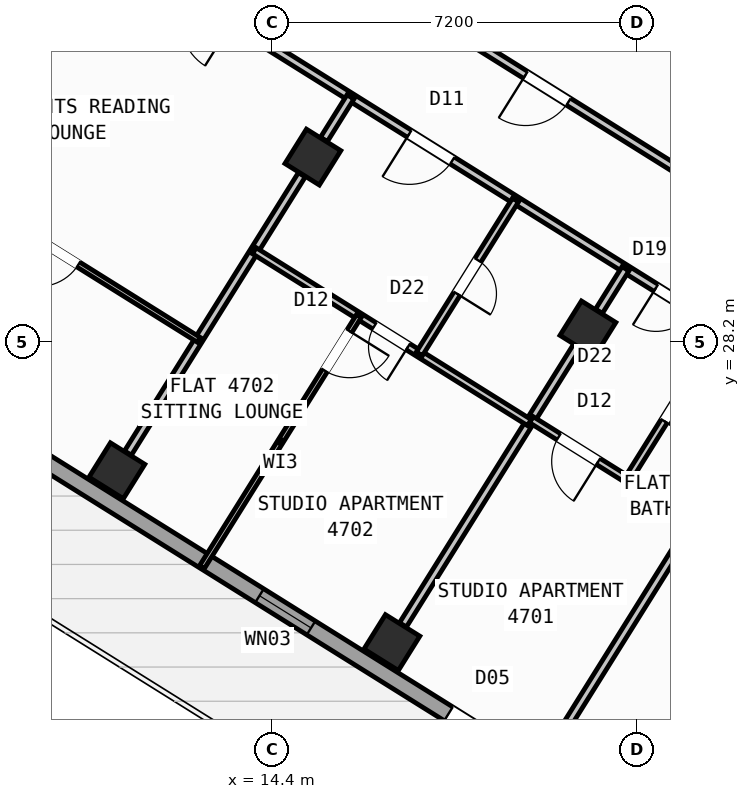
"""IFC4 building model, lengths in metres.
Left out: names, types, materials, properties, quantities, classifications, styles, units other than length and angle.
Written with IfcOpenShell. Run it as: python <this file> out.ifc"""

import sys

from ifc_helpers import new_model, si_unit, direction, frame, frame_2d, origin, origin_2d, place, context, subcontext, project, spatial, rectangle, hollow_rectangle, extrude, source, transform, mapped, element, fill, save


model = new_model("IFC4")
c1 = context("Model", 3, precision=1e-05, world=origin(), true_north=direction((0.0, 1.0)))
c2 = subcontext(c1, "Body", "Model", "MODEL_VIEW")
j1 = project(units=[si_unit("LENGTHUNIT", "METRE"), si_unit("PLANEANGLEUNIT", "RADIAN")], contexts=[c1])
p1 = place(None, origin())
s1 = spatial("IfcSite", under=j1, at=p1, CompositionType="ELEMENT")
p2 = place(p1, origin())
s2 = spatial("IfcBuilding", under=s1, at=p2, CompositionType="ELEMENT")
p3 = place(p2, frame((0.0, 0.0, 187.8)))
s3 = spatial("IfcBuildingStorey", under=s2, at=p3, CompositionType="ELEMENT", Elevation=187.8)
m1 = source(origin(), c2, "Body", "SweptSolid", [
    extrude(hollow_rectangle(XDim=0.8, YDim=0.8, WallThickness=0.032, at=origin_2d()), origin(), (0.0, 0.0, 1.0), 3.6),
])
for number, where, z_axis, x_axis in (
    (1, (20.632, 28.452, 0.0), (0.0, 0.0, 1.0), (-0.848, 0.53, 0.0)),
    (2, (16.764, 22.261, 0.0), (0.0, 0.0, 1.0), (-0.848, 0.53, 0.0)),
    (3, (15.205, 31.844, 0.0), (0.0, 0.0, 1.0), (-0.848, 0.53, 0.0)),
    (4, (11.336, 25.653, 0.0), (0.0, 0.0, 1.0), (-0.848, 0.53, 0.0)),
):
    element("IfcColumn", number, at=place(p3, frame(where, z_axis=z_axis, x_axis=x_axis)), inside=s3, PredefinedType="COLUMN", context=c2, shape_type="MappedRepresentation", body=[
        mapped(m1, transform((0.0, 0.0, 0.0), scale=1.0)),
    ])
p4 = place(p3, frame((31.76, 12.183, 0.0), z_axis=(0.0, 0.0, 1.0), x_axis=(-0.848047074256, 0.529920899612, 0.0)))
e5 = element("IfcWall", 5, at=p4, inside=s3, PredefinedType="STANDARD", context=c2, shape_type="SweptSolid", body=[
    extrude(rectangle(XDim=30.652, YDim=0.32, at=frame_2d((15.326, 0.0))), origin(), (0.0, 0.0, 1.0), 3.35),
])
p5 = place(p4, frame((15.166, 0.0, 0.0)))
e6 = element("IfcOpeningElement", 6, at=p5, cuts=e5, PredefinedType="OPENING", context=c2, shape_type="SweptSolid", body=[
    extrude(rectangle(XDim=1.2, YDim=2.15, at=frame_2d((0.6, 1.075))), frame((0.0, 0.17, 0.0), z_axis=(0.0, -1.0, 0.0), x_axis=(1.0, 0.0, 0.0)), (0.0, 0.0, 1.0), 0.34),
])
p6 = place(p4, frame((2.015, 0.0, 0.8)))
e7 = element("IfcOpeningElement", 7, at=p6, cuts=e5, PredefinedType="OPENING", context=c2, shape_type="SweptSolid", body=[
    extrude(rectangle(XDim=2.1, YDim=1.55, at=frame_2d((1.05, 0.775))), frame((0.0, 0.17, 0.0), z_axis=(0.0, -1.0, 0.0), x_axis=(1.0, 0.0, 0.0)), (0.0, 0.0, 1.0), 0.34),
])
p7 = place(p4, frame((7.244, 0.0, 0.8)))
e8 = element("IfcOpeningElement", 8, at=p7, cuts=e5, PredefinedType="OPENING", context=c2, shape_type="SweptSolid", body=[
    extrude(rectangle(XDim=2.1, YDim=1.55, at=frame_2d((1.05, 0.775))), frame((0.0, 0.17, 0.0), z_axis=(0.0, -1.0, 0.0), x_axis=(1.0, 0.0, 0.0)), (0.0, 0.0, 1.0), 0.34),
])
p8 = place(p4, frame((12.623, 0.0, 1.0)))
e9 = element("IfcOpeningElement", 9, at=p8, cuts=e5, PredefinedType="OPENING", context=c2, shape_type="SweptSolid", body=[
    extrude(rectangle(XDim=0.9, YDim=1.25, at=frame_2d((0.45, 0.625))), frame((0.0, 0.17, 0.0), z_axis=(0.0, -1.0, 0.0), x_axis=(1.0, 0.0, 0.0)), (0.0, 0.0, 1.0), 0.34),
])
p9 = place(p4, frame((19.565, 0.0, 0.95)))
e10 = element("IfcOpeningElement", 10, at=p9, cuts=e5, PredefinedType="OPENING", context=c2, shape_type="SweptSolid", body=[
    extrude(rectangle(XDim=1.2, YDim=1.4, at=frame_2d((0.6, 0.7))), frame((0.0, 0.17, 0.0), z_axis=(0.0, -1.0, 0.0), x_axis=(1.0, 0.0, 0.0)), (0.0, 0.0, 1.0), 0.34),
])
p10 = place(p4, frame((25.983, 0.0, 1.0)))
e11 = element("IfcOpeningElement", 11, at=p10, cuts=e5, PredefinedType="OPENING", context=c2, shape_type="SweptSolid", body=[
    extrude(rectangle(XDim=0.9, YDim=1.25, at=frame_2d((0.45, 0.625))), frame((0.0, 0.17, 0.0), z_axis=(0.0, -1.0, 0.0), x_axis=(1.0, 0.0, 0.0)), (0.0, 0.0, 1.0), 0.34),
])
p11 = place(p4, frame((28.433, 0.0, 1.0)))
e12 = element("IfcOpeningElement", 12, at=p11, cuts=e5, PredefinedType="OPENING", context=c2, shape_type="SweptSolid", body=[
    extrude(rectangle(XDim=0.9, YDim=1.25, at=frame_2d((0.45, 0.625))), frame((0.0, 0.17, 0.0), z_axis=(0.0, -1.0, 0.0), x_axis=(1.0, 0.0, 0.0)), (0.0, 0.0, 1.0), 0.34),
])
p12 = place(p3, frame((5.7, 28.71, 0.0), z_axis=(0.0, 0.0, 1.0), x_axis=(0.529923711467, 0.8480453172, 0.0)))
e13 = element("IfcWall", 13, at=p12, inside=s3, PredefinedType="STANDARD", context=c2, shape_type="SweptSolid", body=[
    extrude(rectangle(XDim=21.587, YDim=0.32, at=frame_2d((10.794, 0.0))), origin(), (0.0, 0.0, 1.0), 2.825),
])
p13 = place(p12, frame((1.44, 0.0, 0.95)))
e14 = element("IfcOpeningElement", 14, at=p13, cuts=e13, PredefinedType="OPENING", context=c2, shape_type="SweptSolid", body=[
    extrude(rectangle(XDim=1.2, YDim=1.4, at=frame_2d((0.6, 0.7))), frame((0.0, 0.17, 0.0), z_axis=(0.0, -1.0, 0.0), x_axis=(1.0, 0.0, 0.0)), (0.0, 0.0, 1.0), 0.34),
])
p14 = place(p12, frame((4.545, 0.0, 0.85)))
e15 = element("IfcOpeningElement", 15, at=p14, cuts=e13, PredefinedType="OPENING", context=c2, shape_type="SweptSolid", body=[
    extrude(rectangle(XDim=1.8, YDim=1.5, at=frame_2d((0.9, 0.75))), frame((0.0, 0.17, 0.0), z_axis=(0.0, -1.0, 0.0), x_axis=(1.0, 0.0, 0.0)), (0.0, 0.0, 1.0), 0.34),
])
p15 = place(p12, frame((12.139, 0.0, 1.0)))
e16 = element("IfcOpeningElement", 16, at=p15, cuts=e13, PredefinedType="OPENING", context=c2, shape_type="SweptSolid", body=[
    extrude(rectangle(XDim=0.9, YDim=1.25, at=frame_2d((0.45, 0.625))), frame((0.0, 0.17, 0.0), z_axis=(0.0, -1.0, 0.0), x_axis=(1.0, 0.0, 0.0)), (0.0, 0.0, 1.0), 0.34),
])
p16 = place(p12, frame((16.35, 0.0, 0.95)))
e17 = element("IfcOpeningElement", 17, at=p16, cuts=e13, PredefinedType="OPENING", context=c2, shape_type="SweptSolid", body=[
    extrude(rectangle(XDim=1.2, YDim=1.4, at=frame_2d((0.6, 0.7))), frame((0.0, 0.17, 0.0), z_axis=(0.0, -1.0, 0.0), x_axis=(1.0, 0.0, 0.0)), (0.0, 0.0, 1.0), 0.34),
])
p17 = place(p12, frame((18.762, 0.0, 0.95)))
e18 = element("IfcOpeningElement", 18, at=p17, cuts=e13, PredefinedType="OPENING", context=c2, shape_type="SweptSolid", body=[
    extrude(rectangle(XDim=1.2, YDim=1.4, at=frame_2d((0.6, 0.7))), frame((0.0, 0.17, 0.0), z_axis=(0.0, -1.0, 0.0), x_axis=(1.0, 0.0, 0.0)), (0.0, 0.0, 1.0), 0.34),
])
p18 = place(p3, frame((17.424, 47.083, 0.0), z_axis=(0.0, 0.0, 1.0), x_axis=(0.848049927979, -0.529916332693, 0.0)))
e19 = element("IfcWall", 19, at=p18, inside=s3, PredefinedType="STANDARD", context=c2, shape_type="SweptSolid", body=[
    extrude(rectangle(XDim=29.223, YDim=0.32, at=frame_2d((14.612, 0.0))), origin(), (0.0, 0.0, 1.0), 3.35),
])
p19 = place(p18, frame((3.764, 0.0, 0.0)))
e20 = element("IfcOpeningElement", 20, at=p19, cuts=e19, PredefinedType="OPENING", context=c2, shape_type="SweptSolid", body=[
    extrude(rectangle(XDim=1.05, YDim=2.15, at=frame_2d((0.525, 1.075))), frame((0.0, 0.17, 0.0), z_axis=(0.0, -1.0, 0.0), x_axis=(1.0, 0.0, 0.0)), (0.0, 0.0, 1.0), 0.34),
])
p20 = place(p18, frame((8.344, 0.0, 0.8)))
e21 = element("IfcOpeningElement", 21, at=p20, cuts=e19, PredefinedType="OPENING", context=c2, shape_type="SweptSolid", body=[
    extrude(rectangle(XDim=2.1, YDim=1.55, at=frame_2d((1.05, 0.775))), frame((0.0, 0.17, 0.0), z_axis=(0.0, -1.0, 0.0), x_axis=(1.0, 0.0, 0.0)), (0.0, 0.0, 1.0), 0.34),
])
p21 = place(p18, frame((13.589, 0.0, 0.85)))
e22 = element("IfcOpeningElement", 22, at=p21, cuts=e19, PredefinedType="OPENING", context=c2, shape_type="SweptSolid", body=[
    extrude(rectangle(XDim=1.8, YDim=1.5, at=frame_2d((0.9, 0.75))), frame((0.0, 0.17, 0.0), z_axis=(0.0, -1.0, 0.0), x_axis=(1.0, 0.0, 0.0)), (0.0, 0.0, 1.0), 0.34),
])
p22 = place(p18, frame((17.104, 0.0, 0.95)))
e23 = element("IfcOpeningElement", 23, at=p22, cuts=e19, PredefinedType="OPENING", context=c2, shape_type="SweptSolid", body=[
    extrude(rectangle(XDim=1.2, YDim=1.4, at=frame_2d((0.6, 0.7))), frame((0.0, 0.17, 0.0), z_axis=(0.0, -1.0, 0.0), x_axis=(1.0, 0.0, 0.0)), (0.0, 0.0, 1.0), 0.34),
])
p23 = place(p18, frame((21.214, 0.0, 0.95)))
e24 = element("IfcOpeningElement", 24, at=p23, cuts=e19, PredefinedType="OPENING", context=c2, shape_type="SweptSolid", body=[
    extrude(rectangle(XDim=1.2, YDim=1.4, at=frame_2d((0.6, 0.7))), frame((0.0, 0.17, 0.0), z_axis=(0.0, -1.0, 0.0), x_axis=(1.0, 0.0, 0.0)), (0.0, 0.0, 1.0), 0.34),
])
p24 = place(p18, frame((25.853, 0.0, 0.95)))
e25 = element("IfcOpeningElement", 25, at=p24, cuts=e19, PredefinedType="OPENING", context=c2, shape_type="SweptSolid", body=[
    extrude(rectangle(XDim=1.2, YDim=1.4, at=frame_2d((0.6, 0.7))), frame((0.0, 0.17, 0.0), z_axis=(0.0, -1.0, 0.0), x_axis=(1.0, 0.0, 0.0)), (0.0, 0.0, 1.0), 0.34),
])
p25 = place(p3, frame((24.588, 27.631, 0.0), z_axis=(0.0, 0.0, 1.0), x_axis=(-0.529914992377, -0.848050765494, 0.0)))
e26 = element("IfcWall", 26, at=p25, inside=s3, PredefinedType="PARTITIONING", context=c2, shape_type="SweptSolid", body=[
    extrude(rectangle(XDim=9.15, YDim=0.16, at=frame_2d((4.575, 0.0))), origin(), (0.0, 0.0, 1.0), 3.34),
])
p26 = place(p3, frame((25.754, 29.497, 0.0), z_axis=(0.0, 0.0, 1.0), x_axis=(-0.848045850158, 0.529922858565, 0.0)))
e27 = element("IfcWall", 27, at=p26, inside=s3, PredefinedType="PARTITIONING", context=c2, shape_type="SweptSolid", body=[
    extrude(rectangle(XDim=16.73, YDim=0.16, at=frame_2d((8.365, 0.0))), origin(), (0.0, 0.0, 1.0), 3.34),
])
p27 = place(p26, frame((2.22, 0.0, 0.0)))
e28 = element("IfcOpeningElement", 28, at=p27, cuts=e27, PredefinedType="OPENING", context=c2, shape_type="SweptSolid", body=[
    extrude(rectangle(XDim=0.86, YDim=2.05, at=frame_2d((0.43, 1.025))), frame((0.0, 0.09, 0.0), z_axis=(0.0, -1.0, 0.0), x_axis=(1.0, 0.0, 0.0)), (0.0, 0.0, 1.0), 0.18),
])
p28 = place(p26, frame((6.49, 0.0, 0.0)))
e29 = element("IfcOpeningElement", 29, at=p28, cuts=e27, PredefinedType="OPENING", context=c2, shape_type="SweptSolid", body=[
    extrude(rectangle(XDim=1.0, YDim=2.1, at=frame_2d((0.5, 1.05))), frame((0.0, 0.09, 0.0), z_axis=(0.0, -1.0, 0.0), x_axis=(1.0, 0.0, 0.0)), (0.0, 0.0, 1.0), 0.18),
])
p29 = place(p26, frame((14.304, 0.0, 0.0)))
e30 = element("IfcOpeningElement", 30, at=p29, cuts=e27, PredefinedType="OPENING", context=c2, shape_type="SweptSolid", body=[
    extrude(rectangle(XDim=1.0, YDim=2.1, at=frame_2d((0.5, 1.05))), frame((0.0, 0.09, 0.0), z_axis=(0.0, -1.0, 0.0), x_axis=(1.0, 0.0, 0.0)), (0.0, 0.0, 1.0), 0.18),
])
p30 = place(p3, frame((24.588, 27.631, 0.0), z_axis=(0.0, 0.0, 1.0), x_axis=(-0.848041752158, 0.529929416617, 0.0)))
e31 = element("IfcWall", 31, at=p30, inside=s3, PredefinedType="PARTITIONING", context=c2, shape_type="SweptSolid", body=[
    extrude(rectangle(XDim=16.73, YDim=0.16, at=frame_2d((8.365, 0.0))), origin(), (0.0, 0.0, 1.0), 3.34),
])
p31 = place(p30, frame((2.22, 0.0, 0.0)))
e32 = element("IfcOpeningElement", 32, at=p31, cuts=e31, PredefinedType="OPENING", context=c2, shape_type="SweptSolid", body=[
    extrude(rectangle(XDim=0.86, YDim=2.05, at=frame_2d((0.43, 1.025))), frame((0.0, 0.09, 0.0), z_axis=(0.0, -1.0, 0.0), x_axis=(1.0, 0.0, 0.0)), (0.0, 0.0, 1.0), 0.18),
])
p32 = place(p30, frame((7.82, 0.0, 0.0)))
e33 = element("IfcOpeningElement", 33, at=p32, cuts=e31, PredefinedType="OPENING", context=c2, shape_type="SweptSolid", body=[
    extrude(rectangle(XDim=1.0, YDim=2.1, at=frame_2d((0.5, 1.05))), frame((0.0, 0.09, 0.0), z_axis=(0.0, -1.0, 0.0), x_axis=(1.0, 0.0, 0.0)), (0.0, 0.0, 1.0), 0.18),
])
p33 = place(p30, frame((12.95, 0.0, 0.0)))
e34 = element("IfcOpeningElement", 34, at=p33, cuts=e31, PredefinedType="OPENING", context=c2, shape_type="SweptSolid", body=[
    extrude(rectangle(XDim=1.0, YDim=2.1, at=frame_2d((0.5, 1.05))), frame((0.0, 0.09, 0.0), z_axis=(0.0, -1.0, 0.0), x_axis=(1.0, 0.0, 0.0)), (0.0, 0.0, 1.0), 0.18),
])
p34 = place(p3, frame((21.374, 29.639, 0.0), z_axis=(0.0, 0.0, 1.0), x_axis=(-0.529998940003, -0.847998304005, 0.0)))
e35 = element("IfcWall", 35, at=p34, inside=s3, PredefinedType="PARTITIONING", context=c2, shape_type="SweptSolid", body=[
    extrude(rectangle(XDim=0.988, YDim=0.16, at=frame_2d((0.494, 0.0))), origin(), (0.0, 0.0, 1.0), 2.825),
])
p35 = place(p3, frame((20.414, 28.103, 0.0), z_axis=(0.0, 0.0, 1.0), x_axis=(-0.529934553702, -0.848038542045, 0.0)))
e36 = element("IfcWall", 36, at=p35, inside=s3, PredefinedType="PARTITIONING", context=c2, shape_type="SweptSolid", body=[
    extrude(rectangle(XDim=6.476, YDim=0.16, at=frame_2d((3.238, 0.0))), origin(), (0.0, 0.0, 1.0), 2.825),
])
p36 = place(p3, frame((22.728, 24.654, 0.0), z_axis=(0.0, 0.0, 1.0), x_axis=(-0.848059820872, 0.529900500304, 0.0)))
e37 = element("IfcWall", 37, at=p36, inside=s3, PredefinedType="PLUMBINGWALL", context=c2, shape_type="SweptSolid", body=[
    extrude(rectangle(XDim=3.79, YDim=0.14, at=frame_2d((1.895, 0.0))), origin(), (0.0, 0.0, 1.0), 3.34),
])
p37 = place(p36, frame((2.23, 0.0, 0.0)))
e38 = element("IfcOpeningElement", 38, at=p37, cuts=e37, PredefinedType="OPENING", context=c2, shape_type="SweptSolid", body=[
    extrude(rectangle(XDim=0.92, YDim=2.08, at=frame_2d((0.46, 1.04))), frame((0.0, 0.08, 0.0), z_axis=(0.0, -1.0, 0.0), x_axis=(1.0, 0.0, 0.0)), (0.0, 0.0, 1.0), 0.16),
])
p38 = place(p3, frame((23.273, 28.452, 0.0), z_axis=(0.0, 0.0, 1.0), x_axis=(-0.529867639402, -0.848080352747, 0.0)))
e39 = element("IfcWall", 39, at=p38, inside=s3, PredefinedType="PLUMBINGWALL", context=c2, shape_type="SweptSolid", body=[
    extrude(rectangle(XDim=3.51, YDim=0.14, at=frame_2d((1.755, 0.0))), origin(), (0.0, 0.0, 1.0), 2.995),
])
p39 = place(p38, frame((1.365, 0.0, 0.0)))
e40 = element("IfcOpeningElement", 40, at=p39, cuts=e39, PredefinedType="OPENING", context=c2, shape_type="SweptSolid", body=[
    extrude(rectangle(XDim=0.78, YDim=2.05, at=frame_2d((0.39, 1.025))), frame((0.0, 0.08, 0.0), z_axis=(0.0, -1.0, 0.0), x_axis=(1.0, 0.0, 0.0)), (0.0, 0.0, 1.0), 0.16),
])
p40 = place(p3, frame((15.946, 33.031, 0.0), z_axis=(0.0, 0.0, 1.0), x_axis=(-0.529821225456, -0.848109349704, 0.0)))
e41 = element("IfcWall", 41, at=p40, inside=s3, PredefinedType="PARTITIONING", context=c2, shape_type="SweptSolid", body=[
    extrude(rectangle(XDim=0.988, YDim=0.16, at=frame_2d((0.494, 0.0))), origin(), (0.0, 0.0, 1.0), 2.825),
])
p41 = place(p3, frame((14.986, 31.494, 0.0), z_axis=(0.0, 0.0, 1.0), x_axis=(-0.529907440938, -0.848055484057, 0.0)))
e42 = element("IfcWall", 42, at=p41, inside=s3, PredefinedType="PARTITIONING", context=c2, shape_type="SweptSolid", body=[
    extrude(rectangle(XDim=6.476, YDim=0.16, at=frame_2d((3.238, 0.0))), origin(), (0.0, 0.0, 1.0), 2.825),
])
p42 = place(p3, frame((19.477, 26.603, 0.0), z_axis=(0.0, 0.0, 1.0), x_axis=(-0.848039019877, 0.529933789039, 0.0)))
e43 = element("IfcWall", 43, at=p42, inside=s3, PredefinedType="PLUMBINGWALL", context=c2, shape_type="SweptSolid", body=[
    extrude(rectangle(XDim=6.4, YDim=0.14, at=frame_2d((3.2, 0.0))), origin(), (0.0, 0.0, 1.0), 3.34),
])
p43 = place(p42, frame((2.824, 0.0, 0.0)))
e44 = element("IfcOpeningElement", 44, at=p43, cuts=e43, PredefinedType="OPENING", context=c2, shape_type="SweptSolid", body=[
    extrude(rectangle(XDim=0.78, YDim=2.05, at=frame_2d((0.39, 1.025))), frame((0.0, 0.08, 0.0), z_axis=(0.0, -1.0, 0.0), x_axis=(1.0, 0.0, 0.0)), (0.0, 0.0, 1.0), 0.16),
])
p44 = place(p3, frame((19.203, 30.996, 0.0), z_axis=(0.0, 0.0, 1.0), x_axis=(-0.529906983049, -0.848055770169, 0.0)))
e45 = element("IfcWall", 45, at=p44, inside=s3, PredefinedType="PLUMBINGWALL", context=c2, shape_type="SweptSolid", body=[
    extrude(rectangle(XDim=3.58, YDim=0.14, at=frame_2d((1.79, 0.0))), origin(), (0.0, 0.0, 1.0), 3.34),
])
p45 = place(p44, frame((1.4, 0.0, 0.0)))
e46 = element("IfcOpeningElement", 46, at=p45, cuts=e45, PredefinedType="OPENING", context=c2, shape_type="SweptSolid", body=[
    extrude(rectangle(XDim=0.78, YDim=2.05, at=frame_2d((0.39, 1.025))), frame((0.0, 0.08, 0.0), z_axis=(0.0, -1.0, 0.0), x_axis=(1.0, 0.0, 0.0)), (0.0, 0.0, 1.0), 0.16),
])
p46 = place(p3, frame((16.112, 28.706, 0.0), z_axis=(0.0, 0.0, 1.0), x_axis=(-0.529916267533, -0.848049968695, 0.0)))
e47 = element("IfcWall", 47, at=p46, inside=s3, PredefinedType="PARTITIONING", context=c2, shape_type="SweptSolid", body=[
    extrude(rectangle(XDim=5.84, YDim=0.11, at=frame_2d((2.92, 0.0))), origin(), (0.0, 0.0, 1.0), 3.34),
])
p47 = place(p46, frame((0.35, 0.0, 0.0)))
e48 = element("IfcOpeningElement", 48, at=p47, cuts=e47, PredefinedType="OPENING", context=c2, shape_type="SweptSolid", body=[
    extrude(rectangle(XDim=0.92, YDim=2.08, at=frame_2d((0.46, 1.04))), frame((0.0, 0.065, 0.0), z_axis=(0.0, -1.0, 0.0), x_axis=(1.0, 0.0, 0.0)), (0.0, 0.0, 1.0), 0.13),
])
p48 = place(p3, frame((12.951, 28.238, 0.0), z_axis=(0.0, 0.0, 1.0), x_axis=(-0.848031959833, 0.529945086874, 0.0)))
e49 = element("IfcWall", 49, at=p48, inside=s3, PredefinedType="PARTITIONING", context=c2, shape_type="SweptSolid", body=[
    extrude(rectangle(XDim=6.52, YDim=0.11, at=frame_2d((3.26, 0.0))), origin(), (0.0, 0.0, 1.0), 3.34),
])
p49 = place(p48, frame((2.8, 0.0, 0.0)))
e50 = element("IfcOpeningElement", 50, at=p49, cuts=e49, PredefinedType="OPENING", context=c2, shape_type="SweptSolid", body=[
    extrude(rectangle(XDim=0.92, YDim=2.08, at=frame_2d((0.46, 1.04))), frame((0.0, 0.065, 0.0), z_axis=(0.0, -1.0, 0.0), x_axis=(1.0, 0.0, 0.0)), (0.0, 0.0, 1.0), 0.13),
])
m2 = source(origin(), c2, "Body", "SweptSolid", [
    extrude(rectangle(XDim=1.2, YDim=2.15, at=frame_2d((0.6, 1.075))), frame((0.0, 0.025, 0.0), z_axis=(0.0, -1.0, 0.0), x_axis=(1.0, 0.0, 0.0)), (0.0, 0.0, 1.0), 0.05),
])
p50 = place(p5, origin())
e51 = element("IfcDoor", 51, at=p50, inside=s3, OperationType="SINGLE_SWING_LEFT", PredefinedType="DOOR", context=c2, shape_type="MappedRepresentation", body=[
    mapped(m2, transform((0.0, 0.0, 0.0), scale=1.0)),
])
fill(e6, e51)
m3 = source(origin(), c2, "Body", "SweptSolid", [
    extrude(rectangle(XDim=1.2, YDim=1.4, at=frame_2d((0.6, 0.7))), frame((0.0, 0.03, 0.0), z_axis=(0.0, -1.0, 0.0), x_axis=(1.0, 0.0, 0.0)), (0.0, 0.0, 1.0), 0.06),
])
p51 = place(p9, origin())
e52 = element("IfcWindow", 52, at=p51, inside=s3, PartitioningType="SINGLE_PANEL", PredefinedType="WINDOW", context=c2, shape_type="MappedRepresentation", body=[
    mapped(m3, transform((0.0, 0.0, 0.0), scale=1.0)),
])
fill(e10, e52)
m4 = source(origin(), c2, "Body", "SweptSolid", [
    extrude(rectangle(XDim=0.86, YDim=2.05, at=frame_2d((0.43, 1.025))), frame((0.0, 0.025, 0.0), z_axis=(0.0, -1.0, 0.0), x_axis=(1.0, 0.0, 0.0)), (0.0, 0.0, 1.0), 0.05),
])
p52 = place(p31, origin())
e53 = element("IfcDoor", 53, at=p52, inside=s3, OperationType="SINGLE_SWING_RIGHT", PredefinedType="DOOR", context=c2, shape_type="MappedRepresentation", body=[
    mapped(m4, transform((0.0, 0.0, 0.0), scale=1.0)),
])
fill(e32, e53)
m5 = source(origin(), c2, "Body", "SweptSolid", [
    extrude(rectangle(XDim=0.92, YDim=2.08, at=frame_2d((0.46, 1.04))), frame((0.0, 0.025, 0.0), z_axis=(0.0, -1.0, 0.0), x_axis=(1.0, 0.0, 0.0)), (0.0, 0.0, 1.0), 0.05),
])
p53 = place(p37, origin())
e54 = element("IfcDoor", 54, at=p53, inside=s3, OperationType="SINGLE_SWING_LEFT", PredefinedType="DOOR", context=c2, shape_type="MappedRepresentation", body=[
    mapped(m5, transform((0.0, 0.0, 0.0), scale=1.0)),
])
fill(e38, e54)
m6 = source(origin(), c2, "Body", "SweptSolid", [
    extrude(rectangle(XDim=0.78, YDim=2.05, at=frame_2d((0.39, 1.025))), frame((0.0, 0.025, 0.0), z_axis=(0.0, -1.0, 0.0), x_axis=(1.0, 0.0, 0.0)), (0.0, 0.0, 1.0), 0.05),
])
p54 = place(p39, origin())
e55 = element("IfcDoor", 55, at=p54, inside=s3, OperationType="SINGLE_SWING_RIGHT", PredefinedType="DOOR", context=c2, shape_type="MappedRepresentation", body=[
    mapped(m6, transform((0.0, 0.0, 0.0), scale=1.0)),
])
fill(e40, e55)
p55 = place(p47, origin())
e56 = element("IfcDoor", 56, at=p55, inside=s3, OperationType="SINGLE_SWING_LEFT", PredefinedType="DOOR", context=c2, shape_type="MappedRepresentation", body=[
    mapped(m5, transform((0.0, 0.0, 0.0), scale=1.0)),
])
fill(e48, e56)
m7 = source(origin(), c2, "Body", "SweptSolid", [
    extrude(rectangle(XDim=1.0, YDim=2.1, at=frame_2d((0.5, 1.05))), frame((0.0, 0.025, 0.0), z_axis=(0.0, -1.0, 0.0), x_axis=(1.0, 0.0, 0.0)), (0.0, 0.0, 1.0), 0.05),
])
p56 = place(p32, origin())
e57 = element("IfcDoor", 57, at=p56, inside=s3, OperationType="SINGLE_SWING_RIGHT", PredefinedType="DOOR", context=c2, shape_type="MappedRepresentation", body=[
    mapped(m7, transform((0.0, 0.0, 0.0), scale=1.0)),
])
fill(e33, e57)
p57 = place(p43, origin())
e58 = element("IfcDoor", 58, at=p57, inside=s3, OperationType="SINGLE_SWING_LEFT", PredefinedType="DOOR", context=c2, shape_type="MappedRepresentation", body=[
    mapped(m6, transform((0.0, 0.0, 0.0), scale=1.0)),
])
fill(e44, e58)
p58 = place(p45, origin())
e59 = element("IfcDoor", 59, at=p58, inside=s3, OperationType="SINGLE_SWING_RIGHT", PredefinedType="DOOR", context=c2, shape_type="MappedRepresentation", body=[
    mapped(m6, transform((0.0, 0.0, 0.0), scale=1.0)),
])
fill(e46, e59)
p59 = place(p49, origin())
e60 = element("IfcDoor", 60, at=p59, inside=s3, OperationType="SINGLE_SWING_RIGHT", PredefinedType="DOOR", context=c2, shape_type="MappedRepresentation", body=[
    mapped(m5, transform((0.0, 0.0, 0.0), scale=1.0)),
])
fill(e50, e60)
p60 = place(p28, origin())
e61 = element("IfcDoor", 61, at=p60, inside=s3, OperationType="SINGLE_SWING_RIGHT", PredefinedType="DOOR", context=c2, shape_type="MappedRepresentation", body=[
    mapped(m7, transform((0.0, 0.0, 0.0), scale=1.0)),
])
fill(e29, e61)
save(model, sys.argv[1])
